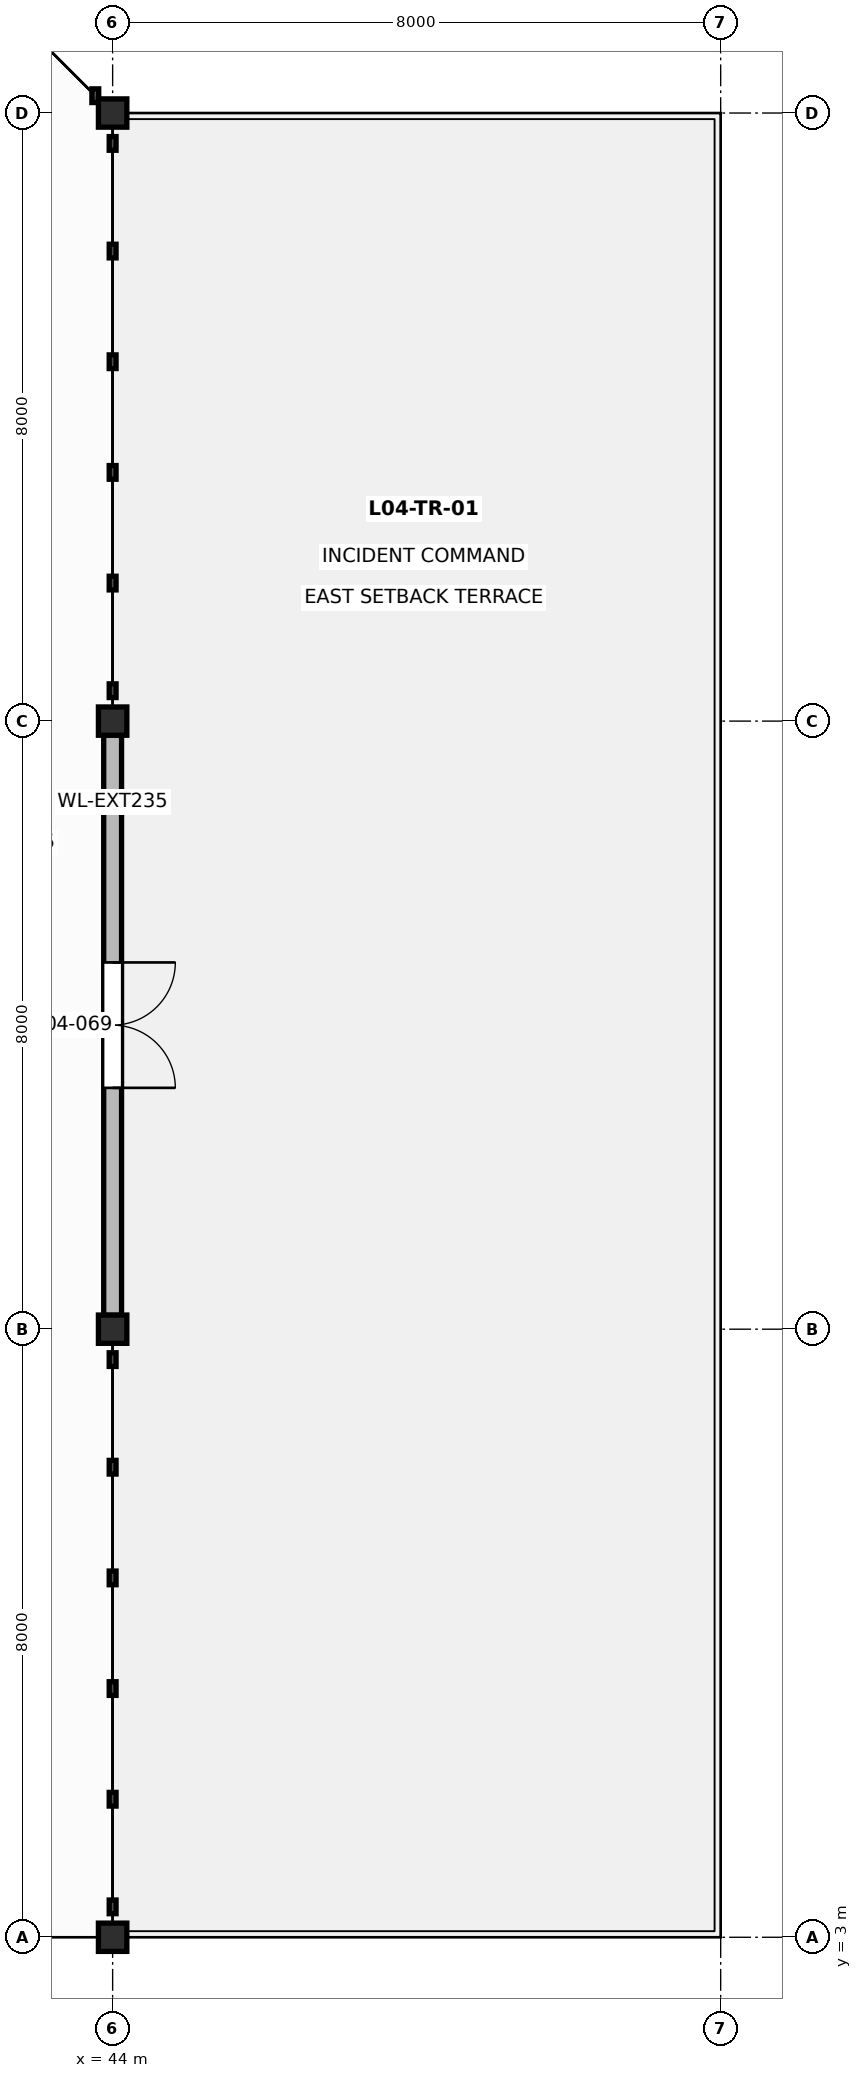
"""IFC4 building model, lengths in metres.
Left out: names, types, materials, properties, quantities, classifications, styles, units other than length and angle.
Written with IfcOpenShell. Run it as: python <this file> out.ifc"""

import sys

from ifc_helpers import new_model, si_unit, direction, frame, frame_2d, origin, origin_2d, place, context, subcontext, project, spatial, rectangle, i_section, extrude, element, fill, save


model = new_model("IFC4")
c1 = context("Model", 3, precision=1e-05, world=origin(), true_north=direction((0.0, 1.0)))
c2 = subcontext(c1, "Body", "Model", "MODEL_VIEW")
j1 = project(units=[si_unit("LENGTHUNIT", "METRE"), si_unit("PLANEANGLEUNIT", "RADIAN")], contexts=[c1])
p1 = place(None, origin())
s1 = spatial("IfcSite", under=j1, at=p1, CompositionType="ELEMENT")
p2 = place(p1, origin())
s2 = spatial("IfcBuilding", under=s1, at=p2, CompositionType="ELEMENT")
p3 = place(p2, frame((0.0, 0.0, 19.8)))
s3 = spatial("IfcBuildingStorey", under=s2, at=p3, CompositionType="ELEMENT", Elevation=19.8)
for number, where, z_axis, x_axis in (
    (1, (44.0, 3.0, 0.0), (0.0, 0.0, 1.0), (1.0, 0.0, 0.0)),
    (2, (44.0, 11.0, 0.0), (0.0, 0.0, 1.0), (1.0, 0.0, 0.0)),
    (3, (44.0, 19.0, 0.0), (0.0, 0.0, 1.0), (1.0, 0.0, 0.0)),
    (4, (44.0, 27.0, 0.0), (0.0, 0.0, 1.0), (1.0, 0.0, 0.0)),
):
    element("IfcColumn", number, at=place(p3, frame(where, z_axis=z_axis, x_axis=x_axis)), inside=s3, PredefinedType="COLUMN", context=c2, shape_type="SweptSolid", body=[
        extrude(i_section(OverallWidth=0.374, OverallDepth=0.372, WebThickness=0.016, FlangeThickness=0.026, at=origin_2d()), origin(), (0.0, 0.0, 1.0), 3.7),
    ])
p4 = place(p3, frame((44.0, 11.182, 0.0), z_axis=(0.0, 0.0, 1.0), x_axis=(0.0, 1.0, 0.0)))
e5 = element("IfcWall", 5, at=p4, inside=s3, PredefinedType="SOLIDWALL", context=c2, shape_type="SweptSolid", body=[
    extrude(rectangle(XDim=7.636, YDim=0.235, at=frame_2d((3.818, 0.0))), origin(), (0.0, 0.0, 1.0), 3.35),
])
p5 = place(p4, frame((2.993, 0.0, 0.0)))
e6 = element("IfcOpeningElement", 6, at=p5, cuts=e5, PredefinedType="OPENING", context=c2, shape_type="SweptSolid", body=[
    extrude(rectangle(XDim=1.65, YDim=2.2, at=frame_2d((0.825, 1.1))), frame((0.0, 0.127, 0.0), z_axis=(0.0, -1.0, 0.0), x_axis=(1.0, 0.0, 0.0)), (0.0, 0.0, 1.0), 0.255),
])
p6 = place(p5, frame((1.65, 0.0, 0.0), z_axis=(0.0, 0.0, 1.0), x_axis=(-1.0, 0.0, 0.0)))
e7 = element("IfcDoor", 7, at=p6, inside=s3, OperationType="DOUBLE_DOOR_SINGLE_SWING", PredefinedType="DOOR", context=c2, shape_type="SweptSolid", body=[
    extrude(rectangle(XDim=1.65, YDim=2.2, at=frame_2d((0.825, 1.1))), frame((0.0, 0.025, 0.0), z_axis=(0.0, -1.0, 0.0), x_axis=(1.0, 0.0, 0.0)), (0.0, 0.0, 1.0), 0.05),
])
fill(e6, e7)
save(model, sys.argv[1])
